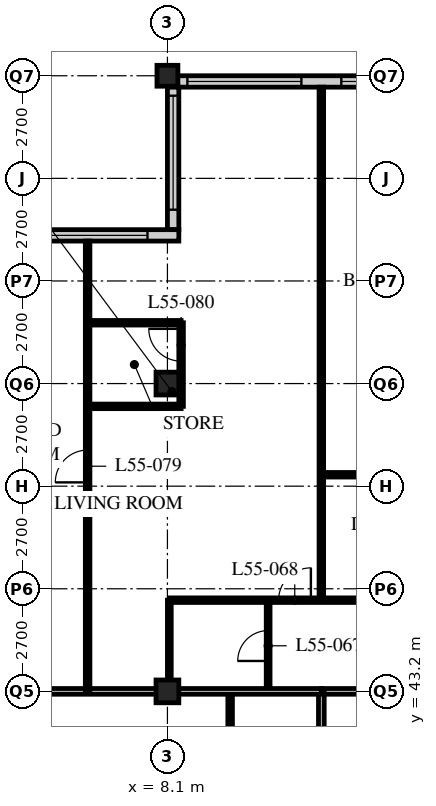
"""IFC4 building model, lengths in metres.
Left out: names, types, materials, properties, quantities, classifications, styles, units other than length and angle.
Written with IfcOpenShell. Run it as: python <this file> out.ifc"""

import sys

from ifc_helpers import new_model, si_unit, direction, frame, frame_2d, origin, origin_2d, place, context, subcontext, project, spatial, rectangle, hollow_rectangle, extrude, element, fill, save


model = new_model("IFC4")
c1 = context("Model", 3, precision=1e-05, world=origin(), true_north=direction((0.0, 1.0)))
c2 = subcontext(c1, "Body", "Model", "MODEL_VIEW")
j1 = project(units=[si_unit("LENGTHUNIT", "METRE"), si_unit("PLANEANGLEUNIT", "RADIAN")], contexts=[c1])
p1 = place(None, origin())
s1 = spatial("IfcSite", under=j1, at=p1, CompositionType="ELEMENT")
p2 = place(p1, origin())
s2 = spatial("IfcBuilding", under=s1, at=p2, CompositionType="ELEMENT")
p3 = place(p2, frame((0.0, 0.0, 213.6)))
s3 = spatial("IfcBuildingStorey", under=s2, at=p3, CompositionType="ELEMENT", Elevation=213.6)
for number, where, z_axis, x_axis in (
    (1, (8.1, 43.2, 0.0), (0.0, 0.0, 1.0), (1.0, 0.0, 0.0)),
    (2, (8.1, 51.3, 0.0), (0.0, 0.0, 1.0), (1.0, 0.0, 0.0)),
):
    element("IfcColumn", number, at=place(p3, frame(where, z_axis=z_axis, x_axis=x_axis)), inside=s3, PredefinedType="COLUMN", context=c2, shape_type="SweptSolid", body=[
        extrude(hollow_rectangle(XDim=0.6, YDim=0.6, WallThickness=0.05, at=origin_2d()), origin(), (0.0, 0.0, 1.0), 3.6),
    ])
p4 = place(p3, frame((8.1, 59.4, 0.0), z_axis=(0.0, 0.0, 1.0), x_axis=(1.0, 0.0, 0.0)))
e3 = element("IfcColumn", 3, at=p4, inside=s3, PredefinedType="COLUMN", context=c2, shape_type="SweptSolid", body=[
    extrude(hollow_rectangle(XDim=0.55, YDim=0.55, WallThickness=0.045, at=origin_2d()), origin(), (0.0, 0.0, 1.0), 3.6),
])
p5 = place(p3, frame((48.3, 59.25, 0.0), z_axis=(0.0, 0.0, 1.0), x_axis=(-1.0, 0.0, 0.0)))
e4 = element("IfcWall", 4, at=p5, inside=s3, PredefinedType="SOLIDWALL", context=c2, shape_type="SweptSolid", body=[
    extrude(rectangle(XDim=40.2, YDim=0.3, at=frame_2d((20.1, 0.0))), origin(), (0.0, 0.0, 1.0), 3.39),
])
p6 = place(p5, frame((0.225, 0.0, 0.6)))
e5 = element("IfcOpeningElement", 5, at=p6, cuts=e4, PredefinedType="OPENING", context=c2, shape_type="SweptSolid", body=[
    extrude(rectangle(XDim=3.0, YDim=2.4, at=frame_2d((1.5, 1.2))), frame((0.0, 0.16, 0.0), z_axis=(0.0, -1.0, 0.0), x_axis=(1.0, 0.0, 0.0)), (0.0, 0.0, 1.0), 0.32),
])
p7 = place(p5, frame((4.275, 0.0, 0.6)))
e6 = element("IfcOpeningElement", 6, at=p7, cuts=e4, PredefinedType="OPENING", context=c2, shape_type="SweptSolid", body=[
    extrude(rectangle(XDim=3.0, YDim=2.4, at=frame_2d((1.5, 1.2))), frame((0.0, 0.16, 0.0), z_axis=(0.0, -1.0, 0.0), x_axis=(1.0, 0.0, 0.0)), (0.0, 0.0, 1.0), 0.32),
])
p8 = place(p5, frame((8.325, 0.0, 0.6)))
e7 = element("IfcOpeningElement", 7, at=p8, cuts=e4, PredefinedType="OPENING", context=c2, shape_type="SweptSolid", body=[
    extrude(rectangle(XDim=3.0, YDim=2.4, at=frame_2d((1.5, 1.2))), frame((0.0, 0.16, 0.0), z_axis=(0.0, -1.0, 0.0), x_axis=(1.0, 0.0, 0.0)), (0.0, 0.0, 1.0), 0.32),
])
p9 = place(p5, frame((12.375, 0.0, 0.6)))
e8 = element("IfcOpeningElement", 8, at=p9, cuts=e4, PredefinedType="OPENING", context=c2, shape_type="SweptSolid", body=[
    extrude(rectangle(XDim=3.0, YDim=2.4, at=frame_2d((1.5, 1.2))), frame((0.0, 0.16, 0.0), z_axis=(0.0, -1.0, 0.0), x_axis=(1.0, 0.0, 0.0)), (0.0, 0.0, 1.0), 0.32),
])
p10 = place(p5, frame((16.425, 0.0, 0.6)))
e9 = element("IfcOpeningElement", 9, at=p10, cuts=e4, PredefinedType="OPENING", context=c2, shape_type="SweptSolid", body=[
    extrude(rectangle(XDim=3.0, YDim=2.4, at=frame_2d((1.5, 1.2))), frame((0.0, 0.16, 0.0), z_axis=(0.0, -1.0, 0.0), x_axis=(1.0, 0.0, 0.0)), (0.0, 0.0, 1.0), 0.32),
])
p11 = place(p5, frame((20.475, 0.0, 0.6)))
e10 = element("IfcOpeningElement", 10, at=p11, cuts=e4, PredefinedType="OPENING", context=c2, shape_type="SweptSolid", body=[
    extrude(rectangle(XDim=3.0, YDim=2.4, at=frame_2d((1.5, 1.2))), frame((0.0, 0.16, 0.0), z_axis=(0.0, -1.0, 0.0), x_axis=(1.0, 0.0, 0.0)), (0.0, 0.0, 1.0), 0.32),
])
p12 = place(p5, frame((24.525, 0.0, 0.6)))
e11 = element("IfcOpeningElement", 11, at=p12, cuts=e4, PredefinedType="OPENING", context=c2, shape_type="SweptSolid", body=[
    extrude(rectangle(XDim=3.0, YDim=2.4, at=frame_2d((1.5, 1.2))), frame((0.0, 0.16, 0.0), z_axis=(0.0, -1.0, 0.0), x_axis=(1.0, 0.0, 0.0)), (0.0, 0.0, 1.0), 0.32),
])
p13 = place(p5, frame((28.575, 0.0, 0.6)))
e12 = element("IfcOpeningElement", 12, at=p13, cuts=e4, PredefinedType="OPENING", context=c2, shape_type="SweptSolid", body=[
    extrude(rectangle(XDim=3.0, YDim=2.4, at=frame_2d((1.5, 1.2))), frame((0.0, 0.16, 0.0), z_axis=(0.0, -1.0, 0.0), x_axis=(1.0, 0.0, 0.0)), (0.0, 0.0, 1.0), 0.32),
])
p14 = place(p5, frame((32.625, 0.0, 0.6)))
e13 = element("IfcOpeningElement", 13, at=p14, cuts=e4, PredefinedType="OPENING", context=c2, shape_type="SweptSolid", body=[
    extrude(rectangle(XDim=3.0, YDim=2.4, at=frame_2d((1.5, 1.2))), frame((0.0, 0.16, 0.0), z_axis=(0.0, -1.0, 0.0), x_axis=(1.0, 0.0, 0.0)), (0.0, 0.0, 1.0), 0.32),
])
p15 = place(p5, frame((36.675, 0.0, 0.6)))
e14 = element("IfcOpeningElement", 14, at=p15, cuts=e4, PredefinedType="OPENING", context=c2, shape_type="SweptSolid", body=[
    extrude(rectangle(XDim=3.0, YDim=2.4, at=frame_2d((1.5, 1.2))), frame((0.0, 0.16, 0.0), z_axis=(0.0, -1.0, 0.0), x_axis=(1.0, 0.0, 0.0)), (0.0, 0.0, 1.0), 0.32),
])
p16 = place(p3, frame((8.25, 59.1, 0.0), z_axis=(0.0, 0.0, 1.0), x_axis=(0.0, -1.0, 0.0)))
e15 = element("IfcWall", 15, at=p16, inside=s3, PredefinedType="SOLIDWALL", context=c2, shape_type="SweptSolid", body=[
    extrude(rectangle(XDim=3.75, YDim=0.3, at=frame_2d((1.875, 0.0))), origin(), (0.0, 0.0, 1.0), 3.39),
])
p17 = place(p16, frame((0.225, 0.0, 0.6)))
e16 = element("IfcOpeningElement", 16, at=p17, cuts=e15, PredefinedType="OPENING", context=c2, shape_type="SweptSolid", body=[
    extrude(rectangle(XDim=3.0, YDim=2.0, at=frame_2d((1.5, 1.0))), frame((0.0, 0.16, 0.0), z_axis=(0.0, -1.0, 0.0), x_axis=(1.0, 0.0, 0.0)), (0.0, 0.0, 1.0), 0.32),
])
p18 = place(p3, frame((8.4, 55.2, 0.0), z_axis=(0.0, 0.0, 1.0), x_axis=(-1.0, 0.0, 0.0)))
e17 = element("IfcWall", 17, at=p18, inside=s3, PredefinedType="SOLIDWALL", context=c2, shape_type="SweptSolid", body=[
    extrude(rectangle(XDim=4.35, YDim=0.3, at=frame_2d((2.175, 0.0))), origin(), (0.0, 0.0, 1.0), 3.39),
])
p19 = place(p18, frame((0.825, 0.0, 0.6)))
e18 = element("IfcOpeningElement", 18, at=p19, cuts=e17, PredefinedType="OPENING", context=c2, shape_type="SweptSolid", body=[
    extrude(rectangle(XDim=3.0, YDim=2.0, at=frame_2d((1.5, 1.0))), frame((0.0, 0.16, 0.0), z_axis=(0.0, -1.0, 0.0), x_axis=(1.0, 0.0, 0.0)), (0.0, 0.0, 1.0), 0.32),
])
p20 = place(p3, frame((12.15, 43.2, 0.0), z_axis=(0.0, 0.0, 1.0), x_axis=(1.0, 0.0, 0.0)))
e19 = element("IfcWall", 19, at=p20, inside=s3, PredefinedType="PARTITIONING", context=c2, shape_type="SweptSolid", body=[
    extrude(rectangle(XDim=36.45, YDim=0.15, at=frame_2d((18.225, 0.0))), origin(), (0.0, 0.0, 1.0), 2.778),
])
p21 = place(p20, frame((4.95, 0.0, 0.0)))
e20 = element("IfcOpeningElement", 20, at=p21, cuts=e19, PredefinedType="OPENING", context=c2, shape_type="SweptSolid", body=[
    extrude(rectangle(XDim=1.0, YDim=2.1, at=frame_2d((0.5, 1.05))), frame((0.0, 0.085, 0.0), z_axis=(0.0, -1.0, 0.0), x_axis=(1.0, 0.0, 0.0)), (0.0, 0.0, 1.0), 0.17),
])
p22 = place(p20, frame((25.0, 0.0, 0.0)))
e21 = element("IfcOpeningElement", 21, at=p22, cuts=e19, PredefinedType="OPENING", context=c2, shape_type="SweptSolid", body=[
    extrude(rectangle(XDim=1.0, YDim=2.1, at=frame_2d((0.5, 1.05))), frame((0.0, 0.085, 0.0), z_axis=(0.0, -1.0, 0.0), x_axis=(1.0, 0.0, 0.0)), (0.0, 0.0, 1.0), 0.17),
])
p23 = place(p20, frame((30.7, 0.0, 0.0)))
e22 = element("IfcOpeningElement", 22, at=p23, cuts=e19, PredefinedType="OPENING", context=c2, shape_type="SweptSolid", body=[
    extrude(rectangle(XDim=1.0, YDim=2.1, at=frame_2d((0.5, 1.05))), frame((0.0, 0.085, 0.0), z_axis=(0.0, -1.0, 0.0), x_axis=(1.0, 0.0, 0.0)), (0.0, 0.0, 1.0), 0.17),
])
p24 = place(p20, frame((33.925, 0.0, 0.0)))
e23 = element("IfcOpeningElement", 23, at=p24, cuts=e19, PredefinedType="OPENING", context=c2, shape_type="SweptSolid", body=[
    extrude(rectangle(XDim=1.0, YDim=2.1, at=frame_2d((0.5, 1.05))), frame((0.0, 0.085, 0.0), z_axis=(0.0, -1.0, 0.0), x_axis=(1.0, 0.0, 0.0)), (0.0, 0.0, 1.0), 0.17),
])
p25 = place(p20, frame((1.525, 0.0, 0.0)))
e24 = element("IfcOpeningElement", 24, at=p25, cuts=e19, PredefinedType="OPENING", context=c2, shape_type="SweptSolid", body=[
    extrude(rectangle(XDim=1.0, YDim=2.1, at=frame_2d((0.5, 1.05))), frame((0.0, 0.085, 0.0), z_axis=(0.0, -1.0, 0.0), x_axis=(1.0, 0.0, 0.0)), (0.0, 0.0, 1.0), 0.17),
])
p26 = place(p3, frame((12.15, 18.9, 0.0), z_axis=(0.0, 0.0, 1.0), x_axis=(0.0, 1.0, 0.0)))
e25 = element("IfcWall", 25, at=p26, inside=s3, PredefinedType="PARTITIONING", context=c2, shape_type="SweptSolid", body=[
    extrude(rectangle(XDim=24.3, YDim=0.15, at=frame_2d((12.15, 0.0))), origin(), (0.0, 0.0, 1.0), 3.39),
])
p27 = place(p26, frame((0.4, 0.0, 0.0)))
e26 = element("IfcOpeningElement", 26, at=p27, cuts=e25, PredefinedType="OPENING", context=c2, shape_type="SweptSolid", body=[
    extrude(rectangle(XDim=1.0, YDim=2.1, at=frame_2d((0.5, 1.05))), frame((0.0, 0.085, 0.0), z_axis=(0.0, -1.0, 0.0), x_axis=(1.0, 0.0, 0.0)), (0.0, 0.0, 1.0), 0.17),
])
p28 = place(p26, frame((16.6, 0.0, 0.0)))
e27 = element("IfcOpeningElement", 27, at=p28, cuts=e25, PredefinedType="OPENING", context=c2, shape_type="SweptSolid", body=[
    extrude(rectangle(XDim=1.0, YDim=2.1, at=frame_2d((0.5, 1.05))), frame((0.0, 0.085, 0.0), z_axis=(0.0, -1.0, 0.0), x_axis=(1.0, 0.0, 0.0)), (0.0, 0.0, 1.0), 0.17),
])
p29 = place(p3, frame((9.75, 18.9, 0.0), z_axis=(0.0, 0.0, 1.0), x_axis=(0.0, 1.0, 0.0)))
e28 = element("IfcWall", 28, at=p29, inside=s3, PredefinedType="PARTITIONING", context=c2, shape_type="SweptSolid", body=[
    extrude(rectangle(XDim=24.3, YDim=0.12, at=frame_2d((12.15, 0.0))), origin(), (0.0, 0.0, 1.0), 3.39),
])
p30 = place(p29, frame((0.975, 0.0, 0.0)))
e29 = element("IfcOpeningElement", 29, at=p30, cuts=e28, PredefinedType="OPENING", context=c2, shape_type="SweptSolid", body=[
    extrude(rectangle(XDim=0.85, YDim=2.1, at=frame_2d((0.425, 1.05))), frame((0.0, 0.07, 0.0), z_axis=(0.0, -1.0, 0.0), x_axis=(1.0, 0.0, 0.0)), (0.0, 0.0, 1.0), 0.14),
])
p31 = place(p29, frame((8.425, 0.0, 0.0)))
e30 = element("IfcOpeningElement", 30, at=p31, cuts=e28, PredefinedType="OPENING", context=c2, shape_type="SweptSolid", body=[
    extrude(rectangle(XDim=0.85, YDim=2.1, at=frame_2d((0.425, 1.05))), frame((0.0, 0.07, 0.0), z_axis=(0.0, -1.0, 0.0), x_axis=(1.0, 0.0, 0.0)), (0.0, 0.0, 1.0), 0.14),
])
p32 = place(p29, frame((12.475, 0.0, 0.0)))
e31 = element("IfcOpeningElement", 31, at=p32, cuts=e28, PredefinedType="OPENING", context=c2, shape_type="SweptSolid", body=[
    extrude(rectangle(XDim=0.85, YDim=2.1, at=frame_2d((0.425, 1.05))), frame((0.0, 0.07, 0.0), z_axis=(0.0, -1.0, 0.0), x_axis=(1.0, 0.0, 0.0)), (0.0, 0.0, 1.0), 0.14),
])
p33 = place(p29, frame((17.175, 0.0, 0.0)))
e32 = element("IfcOpeningElement", 32, at=p33, cuts=e28, PredefinedType="OPENING", context=c2, shape_type="SweptSolid", body=[
    extrude(rectangle(XDim=0.85, YDim=2.1, at=frame_2d((0.425, 1.05))), frame((0.0, 0.07, 0.0), z_axis=(0.0, -1.0, 0.0), x_axis=(1.0, 0.0, 0.0)), (0.0, 0.0, 1.0), 0.14),
])
p34 = place(p29, frame((20.575, 0.0, 0.0)))
e33 = element("IfcOpeningElement", 33, at=p34, cuts=e28, PredefinedType="OPENING", context=c2, shape_type="SweptSolid", body=[
    extrude(rectangle(XDim=0.85, YDim=2.1, at=frame_2d((0.425, 1.05))), frame((0.0, 0.07, 0.0), z_axis=(0.0, -1.0, 0.0), x_axis=(1.0, 0.0, 0.0)), (0.0, 0.0, 1.0), 0.14),
])
p35 = place(p3, frame((10.75, 43.2, 0.0), z_axis=(0.0, 0.0, 1.0), x_axis=(0.0, 1.0, 0.0)))
e34 = element("IfcWall", 34, at=p35, inside=s3, PredefinedType="PARTITIONING", context=c2, shape_type="SweptSolid", body=[
    extrude(rectangle(XDim=2.4, YDim=0.1, at=frame_2d((1.2, 0.0))), origin(), (0.0, 0.0, 1.0), 3.39),
])
p36 = place(p35, frame((0.8, 0.0, 0.0)))
e35 = element("IfcOpeningElement", 35, at=p36, cuts=e34, PredefinedType="OPENING", context=c2, shape_type="SweptSolid", body=[
    extrude(rectangle(XDim=0.8, YDim=2.1, at=frame_2d((0.4, 1.05))), frame((0.0, 0.06, 0.0), z_axis=(0.0, -1.0, 0.0), x_axis=(1.0, 0.0, 0.0)), (0.0, 0.0, 1.0), 0.12),
])
p37 = place(p3, frame((8.15, 43.2, 0.0), z_axis=(0.0, 0.0, 1.0), x_axis=(0.0, 1.0, 0.0)))
e36 = element("IfcWall", 36, at=p37, inside=s3, PredefinedType="PARTITIONING", context=c2, shape_type="SweptSolid", body=[
    extrude(rectangle(XDim=2.4, YDim=0.1, at=frame_2d((1.2, 0.0))), origin(), (0.0, 0.0, 1.0), 2.778),
])
p38 = place(p3, frame((8.15, 45.6, 0.0), z_axis=(0.0, 0.0, 1.0), x_axis=(1.0, 0.0, 0.0)))
e37 = element("IfcWall", 37, at=p38, inside=s3, PredefinedType="PARTITIONING", context=c2, shape_type="SweptSolid", body=[
    extrude(rectangle(XDim=28.3, YDim=0.12, at=frame_2d((14.15, 0.0))), origin(), (0.0, 0.0, 1.0), 3.39),
])
p39 = place(p38, frame((9.025, 0.0, 0.0)))
e38 = element("IfcOpeningElement", 38, at=p39, cuts=e37, PredefinedType="OPENING", context=c2, shape_type="SweptSolid", body=[
    extrude(rectangle(XDim=0.85, YDim=2.1, at=frame_2d((0.425, 1.05))), frame((0.0, 0.07, 0.0), z_axis=(0.0, -1.0, 0.0), x_axis=(1.0, 0.0, 0.0)), (0.0, 0.0, 1.0), 0.14),
])
p40 = place(p38, frame((16.475, 0.0, 0.0)))
e39 = element("IfcOpeningElement", 39, at=p40, cuts=e37, PredefinedType="OPENING", context=c2, shape_type="SweptSolid", body=[
    extrude(rectangle(XDim=0.85, YDim=2.1, at=frame_2d((0.425, 1.05))), frame((0.0, 0.07, 0.0), z_axis=(0.0, -1.0, 0.0), x_axis=(1.0, 0.0, 0.0)), (0.0, 0.0, 1.0), 0.14),
])
p41 = place(p38, frame((20.525, 0.0, 0.0)))
e40 = element("IfcOpeningElement", 40, at=p41, cuts=e37, PredefinedType="OPENING", context=c2, shape_type="SweptSolid", body=[
    extrude(rectangle(XDim=0.85, YDim=2.1, at=frame_2d((0.425, 1.05))), frame((0.0, 0.07, 0.0), z_axis=(0.0, -1.0, 0.0), x_axis=(1.0, 0.0, 0.0)), (0.0, 0.0, 1.0), 0.14),
])
p42 = place(p38, frame((24.575, 0.0, 0.0)))
e41 = element("IfcOpeningElement", 41, at=p42, cuts=e37, PredefinedType="OPENING", context=c2, shape_type="SweptSolid", body=[
    extrude(rectangle(XDim=0.85, YDim=2.1, at=frame_2d((0.425, 1.05))), frame((0.0, 0.07, 0.0), z_axis=(0.0, -1.0, 0.0), x_axis=(1.0, 0.0, 0.0)), (0.0, 0.0, 1.0), 0.14),
])
p43 = place(p38, frame((6.725, 0.0, 0.0)))
e42 = element("IfcOpeningElement", 42, at=p43, cuts=e37, PredefinedType="OPENING", context=c2, shape_type="SweptSolid", body=[
    extrude(rectangle(XDim=0.85, YDim=2.1, at=frame_2d((0.425, 1.05))), frame((0.0, 0.07, 0.0), z_axis=(0.0, -1.0, 0.0), x_axis=(1.0, 0.0, 0.0)), (0.0, 0.0, 1.0), 0.14),
])
p44 = place(p38, frame((2.875, 0.0, 0.0)))
e43 = element("IfcOpeningElement", 43, at=p44, cuts=e37, PredefinedType="OPENING", context=c2, shape_type="SweptSolid", body=[
    extrude(rectangle(XDim=0.85, YDim=2.1, at=frame_2d((0.425, 1.05))), frame((0.0, 0.07, 0.0), z_axis=(0.0, -1.0, 0.0), x_axis=(1.0, 0.0, 0.0)), (0.0, 0.0, 1.0), 0.14),
])
p45 = place(p3, frame((12.15, 45.6, 0.0), z_axis=(0.0, 0.0, 1.0), x_axis=(0.0, 1.0, 0.0)))
e44 = element("IfcWall", 44, at=p45, inside=s3, PredefinedType="PARTITIONING", context=c2, shape_type="SweptSolid", body=[
    extrude(rectangle(XDim=13.5, YDim=0.12, at=frame_2d((6.75, 0.0))), origin(), (0.0, 0.0, 1.0), 3.39),
])
p46 = place(p3, frame((0.3, 43.2, 0.0), z_axis=(0.0, 0.0, 1.0), x_axis=(1.0, 0.0, 0.0)))
e45 = element("IfcWall", 45, at=p46, inside=s3, PredefinedType="PARTITIONING", context=c2, shape_type="SweptSolid", body=[
    extrude(rectangle(XDim=11.85, YDim=0.15, at=frame_2d((5.925, 0.0))), origin(), (0.0, 0.0, 1.0), 2.778),
])
p47 = place(p3, frame((12.15, 48.9, 0.0), z_axis=(0.0, 0.0, 1.0), x_axis=(1.0, 0.0, 0.0)))
e46 = element("IfcWall", 46, at=p47, inside=s3, PredefinedType="PARTITIONING", context=c2, shape_type="SweptSolid", body=[
    extrude(rectangle(XDim=4.05, YDim=0.12, at=frame_2d((2.025, 0.0))), origin(), (0.0, 0.0, 1.0), 3.39),
])
p48 = place(p47, frame((1.6, 0.0, 0.0)))
e47 = element("IfcOpeningElement", 47, at=p48, cuts=e46, PredefinedType="OPENING", context=c2, shape_type="SweptSolid", body=[
    extrude(rectangle(XDim=0.85, YDim=2.1, at=frame_2d((0.425, 1.05))), frame((0.0, 0.07, 0.0), z_axis=(0.0, -1.0, 0.0), x_axis=(1.0, 0.0, 0.0)), (0.0, 0.0, 1.0), 0.14),
])
p49 = place(p3, frame((6.0, 43.2, 0.0), z_axis=(0.0, 0.0, 1.0), x_axis=(0.0, 1.0, 0.0)))
e48 = element("IfcWall", 48, at=p49, inside=s3, PredefinedType="PARTITIONING", context=c2, shape_type="SweptSolid", body=[
    extrude(rectangle(XDim=11.85, YDim=0.12, at=frame_2d((5.925, 0.0))), origin(), (0.0, 0.0, 1.0), 3.39),
])
p50 = place(p49, frame((5.5, 0.0, 0.0)))
e49 = element("IfcOpeningElement", 49, at=p50, cuts=e48, PredefinedType="OPENING", context=c2, shape_type="SweptSolid", body=[
    extrude(rectangle(XDim=0.85, YDim=2.1, at=frame_2d((0.425, 1.05))), frame((0.0, 0.07, 0.0), z_axis=(0.0, -1.0, 0.0), x_axis=(1.0, 0.0, 0.0)), (0.0, 0.0, 1.0), 0.14),
])
for number, where, z_axis, x_axis in (
    (50, (6.0, 50.7, 0.0), (0.0, 0.0, 1.0), (1.0, 0.0, 0.0)),
    (51, (6.0, 52.9, 0.0), (0.0, 0.0, 1.0), (1.0, 0.0, 0.0)),
):
    element("IfcWall", number, at=place(p3, frame(where, z_axis=z_axis, x_axis=x_axis)), inside=s3, PredefinedType="PARTITIONING", context=c2, shape_type="SweptSolid", body=[
        extrude(rectangle(XDim=2.46, YDim=0.12, at=frame_2d((1.23, 0.0))), origin(), (0.0, 0.0, 1.0), 3.39),
    ])
p51 = place(p3, frame((8.46, 50.7, 0.0), z_axis=(0.0, 0.0, 1.0), x_axis=(0.0, 1.0, 0.0)))
e52 = element("IfcWall", 52, at=p51, inside=s3, PredefinedType="PARTITIONING", context=c2, shape_type="SweptSolid", body=[
    extrude(rectangle(XDim=2.2, YDim=0.12, at=frame_2d((1.1, 0.0))), origin(), (0.0, 0.0, 1.0), 3.39),
])
p52 = place(p51, frame((1.19, 0.0, 0.0)))
e53 = element("IfcOpeningElement", 53, at=p52, cuts=e52, PredefinedType="OPENING", context=c2, shape_type="SweptSolid", body=[
    extrude(rectangle(XDim=0.85, YDim=2.1, at=frame_2d((0.425, 1.05))), frame((0.0, 0.07, 0.0), z_axis=(0.0, -1.0, 0.0), x_axis=(1.0, 0.0, 0.0)), (0.0, 0.0, 1.0), 0.14),
])
p53 = place(p14, origin())
e54 = element("IfcWindow", 54, at=p53, inside=s3, PartitioningType="SINGLE_PANEL", PredefinedType="WINDOW", context=c2, shape_type="SweptSolid", body=[
    extrude(rectangle(XDim=3.0, YDim=2.4, at=frame_2d((1.5, 1.2))), frame((0.0, 0.03, 0.0), z_axis=(0.0, -1.0, 0.0), x_axis=(1.0, 0.0, 0.0)), (0.0, 0.0, 1.0), 0.06),
])
fill(e13, e54)
p54 = place(p15, origin())
e55 = element("IfcWindow", 55, at=p54, inside=s3, PartitioningType="SINGLE_PANEL", PredefinedType="WINDOW", context=c2, shape_type="SweptSolid", body=[
    extrude(rectangle(XDim=3.0, YDim=2.4, at=frame_2d((1.5, 1.2))), frame((0.0, 0.03, 0.0), z_axis=(0.0, -1.0, 0.0), x_axis=(1.0, 0.0, 0.0)), (0.0, 0.0, 1.0), 0.06),
])
fill(e14, e55)
p55 = place(p17, origin())
e56 = element("IfcWindow", 56, at=p55, inside=s3, PartitioningType="SINGLE_PANEL", PredefinedType="WINDOW", context=c2, shape_type="SweptSolid", body=[
    extrude(rectangle(XDim=3.0, YDim=2.0, at=frame_2d((1.5, 1.0))), frame((0.0, 0.03, 0.0), z_axis=(0.0, -1.0, 0.0), x_axis=(1.0, 0.0, 0.0)), (0.0, 0.0, 1.0), 0.06),
])
fill(e16, e56)
p56 = place(p19, origin())
e57 = element("IfcWindow", 57, at=p56, inside=s3, PartitioningType="SINGLE_PANEL", PredefinedType="WINDOW", context=c2, shape_type="SweptSolid", body=[
    extrude(rectangle(XDim=3.0, YDim=2.0, at=frame_2d((1.5, 1.0))), frame((0.0, 0.03, 0.0), z_axis=(0.0, -1.0, 0.0), x_axis=(1.0, 0.0, 0.0)), (0.0, 0.0, 1.0), 0.06),
])
fill(e18, e57)
p57 = place(p36, origin())
e58 = element("IfcDoor", 58, at=p57, inside=s3, OperationType="SINGLE_SWING_LEFT", PredefinedType="DOOR", context=c2, shape_type="SweptSolid", body=[
    extrude(rectangle(XDim=0.8, YDim=2.1, at=frame_2d((0.4, 1.05))), frame((0.0, 0.025, 0.0), z_axis=(0.0, -1.0, 0.0), x_axis=(1.0, 0.0, 0.0)), (0.0, 0.0, 1.0), 0.05),
])
fill(e35, e58)
p58 = place(p44, origin())
e59 = element("IfcDoor", 59, at=p58, inside=s3, OperationType="SINGLE_SWING_RIGHT", PredefinedType="DOOR", context=c2, shape_type="SweptSolid", body=[
    extrude(rectangle(XDim=0.85, YDim=2.1, at=frame_2d((0.425, 1.05))), frame((0.0, 0.025, 0.0), z_axis=(0.0, -1.0, 0.0), x_axis=(1.0, 0.0, 0.0)), (0.0, 0.0, 1.0), 0.05),
])
fill(e43, e59)
p59 = place(p50, origin())
e60 = element("IfcDoor", 60, at=p59, inside=s3, OperationType="SINGLE_SWING_LEFT", PredefinedType="DOOR", context=c2, shape_type="SweptSolid", body=[
    extrude(rectangle(XDim=0.85, YDim=2.1, at=frame_2d((0.425, 1.05))), frame((0.0, 0.025, 0.0), z_axis=(0.0, -1.0, 0.0), x_axis=(1.0, 0.0, 0.0)), (0.0, 0.0, 1.0), 0.05),
])
fill(e49, e60)
p60 = place(p52, origin())
e61 = element("IfcDoor", 61, at=p60, inside=s3, OperationType="SINGLE_SWING_RIGHT", PredefinedType="DOOR", context=c2, shape_type="SweptSolid", body=[
    extrude(rectangle(XDim=0.85, YDim=2.1, at=frame_2d((0.425, 1.05))), frame((0.0, 0.025, 0.0), z_axis=(0.0, -1.0, 0.0), x_axis=(1.0, 0.0, 0.0)), (0.0, 0.0, 1.0), 0.05),
])
fill(e53, e61)
save(model, sys.argv[1])
